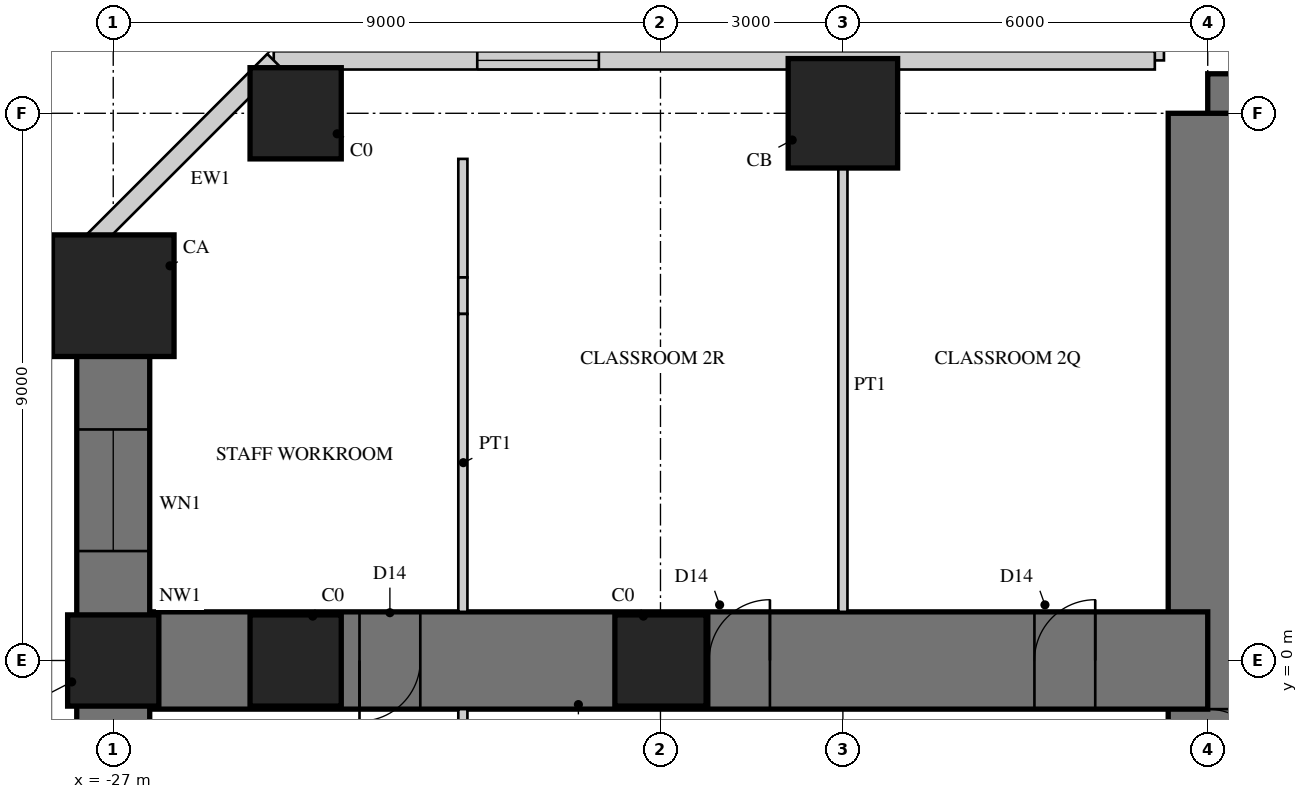
"""IFC4 building model, lengths in metres.
Left out: names, types, materials, properties, quantities, classifications, styles, units other than length and angle.
Written with IfcOpenShell. Run it as: python <this file> out.ifc"""

import sys

from ifc_helpers import new_model, si_unit, direction, frame, frame_2d, origin, origin_2d, place, context, subcontext, project, spatial, rectangle, hollow_rectangle, extrude, element, fill, save


model = new_model("IFC4")
c1 = context("Model", 3, precision=1e-05, world=origin(), true_north=direction((0.0, 1.0)))
c2 = subcontext(c1, "Body", "Model", "MODEL_VIEW")
j1 = project(units=[si_unit("LENGTHUNIT", "METRE"), si_unit("PLANEANGLEUNIT", "RADIAN")], contexts=[c1])
p1 = place(None, origin())
s1 = spatial("IfcSite", under=j1, at=p1, CompositionType="ELEMENT")
p2 = place(p1, origin())
s2 = spatial("IfcBuilding", under=s1, at=p2, CompositionType="ELEMENT")
p3 = place(p2, frame((0.0, 0.0, 9.5)))
s3 = spatial("IfcBuildingStorey", under=s2, at=p3, CompositionType="ELEMENT", Elevation=9.5)
p4 = place(p3, frame((9.0, 9.0, 0.0), z_axis=(0.0, 0.0, 1.0), x_axis=(-1.0, 0.0, 0.0)))
e1 = element("IfcWall", 1, at=p4, inside=s3, PredefinedType="SHEAR", context=c2, shape_type="SweptSolid", body=[
    extrude(rectangle(XDim=18.0, YDim=1.3, at=frame_2d((9.0, 0.0))), origin(), (0.0, 0.0, 1.0), 4.5),
])
p5 = place(p4, frame((9.8, 0.0, 0.0)))
e2 = element("IfcOpeningElement", 2, at=p5, cuts=e1, PredefinedType="OPENING", context=c2, shape_type="SweptSolid", body=[
    extrude(rectangle(XDim=1.0, YDim=2.4, at=frame_2d((0.5, 1.2))), frame((0.0, 0.66, 0.0), z_axis=(0.0, -1.0, 0.0), x_axis=(1.0, 0.0, 0.0)), (0.0, 0.0, 1.0), 1.32),
])
p6 = place(p3, frame((-9.0, 9.0, 0.0), z_axis=(0.0, 0.0, 1.0), x_axis=(0.0, -1.0, 0.0)))
e3 = element("IfcWall", 3, at=p6, inside=s3, PredefinedType="SHEAR", context=c2, shape_type="SweptSolid", body=[
    extrude(rectangle(XDim=18.0, YDim=1.3, at=frame_2d((9.0, 0.0))), origin(), (0.0, 0.0, 1.0), 4.5),
])
p7 = place(p6, frame((9.8, 0.0, 0.0)))
e4 = element("IfcOpeningElement", 4, at=p7, cuts=e3, PredefinedType="OPENING", context=c2, shape_type="SweptSolid", body=[
    extrude(rectangle(XDim=1.0, YDim=2.4, at=frame_2d((0.5, 1.2))), frame((0.0, 0.66, 0.0), z_axis=(0.0, -1.0, 0.0), x_axis=(1.0, 0.0, 0.0)), (0.0, 0.0, 1.0), 1.32),
])
p8 = place(p3, frame((-9.0, 0.0, 0.0), z_axis=(0.0, 0.0, 1.0), x_axis=(-1.0, 0.0, 0.0)))
e5 = element("IfcWall", 5, at=p8, inside=s3, PredefinedType="SHEAR", context=c2, shape_type="SweptSolid", body=[
    extrude(rectangle(XDim=18.0, YDim=1.6, at=frame_2d((9.0, 0.0))), origin(), (0.0, 0.0, 1.0), 4.5),
])
p9 = place(p8, frame((1.85, 0.0, 0.0)))
e6 = element("IfcOpeningElement", 6, at=p9, cuts=e5, PredefinedType="OPENING", context=c2, shape_type="SweptSolid", body=[
    extrude(rectangle(XDim=1.0, YDim=2.2, at=frame_2d((0.5, 1.1))), frame((0.0, 0.81, 0.0), z_axis=(0.0, -1.0, 0.0), x_axis=(1.0, 0.0, 0.0)), (0.0, 0.0, 1.0), 1.62),
])
p10 = place(p8, frame((7.2, 0.0, 0.0)))
e7 = element("IfcOpeningElement", 7, at=p10, cuts=e5, PredefinedType="OPENING", context=c2, shape_type="SweptSolid", body=[
    extrude(rectangle(XDim=1.0, YDim=2.2, at=frame_2d((0.5, 1.1))), frame((0.0, 0.81, 0.0), z_axis=(0.0, -1.0, 0.0), x_axis=(1.0, 0.0, 0.0)), (0.0, 0.0, 1.0), 1.62),
])
p11 = place(p8, frame((12.95, 0.0, 0.0)))
e8 = element("IfcOpeningElement", 8, at=p11, cuts=e5, PredefinedType="OPENING", context=c2, shape_type="SweptSolid", body=[
    extrude(rectangle(XDim=1.0, YDim=2.2, at=frame_2d((0.5, 1.1))), frame((0.0, 0.81, 0.0), z_axis=(0.0, -1.0, 0.0), x_axis=(1.0, 0.0, 0.0)), (0.0, 0.0, 1.0), 1.62),
])
p12 = place(p3, frame((-27.0, 6.0, 0.0), z_axis=(0.0, 0.0, 1.0), x_axis=(0.0, -1.0, 0.0)))
e9 = element("IfcWall", 9, at=p12, inside=s3, PredefinedType="SHEAR", context=c2, shape_type="SweptSolid", body=[
    extrude(rectangle(XDim=12.0, YDim=1.2, at=frame_2d((6.0, 0.0))), origin(), (0.0, 0.0, 1.0), 4.5),
])
p13 = place(p12, frame((2.2, 0.0, 0.9)))
e10 = element("IfcOpeningElement", 10, at=p13, cuts=e9, PredefinedType="OPENING", context=c2, shape_type="SweptSolid", body=[
    extrude(rectangle(XDim=2.0, YDim=1.8, at=frame_2d((1.0, 0.9))), frame((0.0, 0.61, 0.0), z_axis=(0.0, -1.0, 0.0), x_axis=(1.0, 0.0, 0.0)), (0.0, 0.0, 1.0), 1.22),
])
p14 = place(p12, frame((7.8, 0.0, 0.9)))
e11 = element("IfcOpeningElement", 11, at=p14, cuts=e9, PredefinedType="OPENING", context=c2, shape_type="SweptSolid", body=[
    extrude(rectangle(XDim=2.0, YDim=1.8, at=frame_2d((1.0, 0.9))), frame((0.0, 0.61, 0.0), z_axis=(0.0, -1.0, 0.0), x_axis=(1.0, 0.0, 0.0)), (0.0, 0.0, 1.0), 1.22),
])
p15 = place(p3, frame((-15.0, 9.0, 0.0), z_axis=(0.0, 0.0, 1.0), x_axis=(1.0, 0.0, 0.0)))
e12 = element("IfcColumn", 12, at=p15, inside=s3, PredefinedType="COLUMN", context=c2, shape_type="SweptSolid", body=[
    extrude(rectangle(XDim=1.8, YDim=1.8, at=origin_2d()), origin(), (0.0, 0.0, 1.0), 4.5),
])
p16 = place(p3, frame((-24.0, 9.0, 0.0), z_axis=(0.0, 0.0, 1.0), x_axis=(1.0, 0.0, 0.0)))
e13 = element("IfcColumn", 13, at=p16, inside=s3, PredefinedType="COLUMN", context=c2, shape_type="SweptSolid", body=[
    extrude(rectangle(XDim=1.5, YDim=1.5, at=origin_2d()), origin(), (0.0, 0.0, 1.0), 4.5),
])
p17 = place(p3, frame((-27.0, 6.0, 0.0), z_axis=(0.0, 0.0, 1.0), x_axis=(1.0, 0.0, 0.0)))
e14 = element("IfcColumn", 14, at=p17, inside=s3, PredefinedType="COLUMN", context=c2, shape_type="SweptSolid", body=[
    extrude(rectangle(XDim=2.0, YDim=2.0, at=origin_2d()), origin(), (0.0, 0.0, 1.0), 4.5),
])
for number, where, z_axis, x_axis in (
    (15, (-27.0, 0.0, 0.0), (0.0, 0.0, 1.0), (1.0, 0.0, 0.0)),
    (16, (-18.0, 0.0, 0.0), (0.0, 0.0, 1.0), (1.0, 0.0, 0.0)),
    (17, (-24.0, 0.0, 0.0), (0.0, 0.0, 1.0), (1.0, 0.0, 0.0)),
):
    element("IfcColumn", number, at=place(p3, frame(where, z_axis=z_axis, x_axis=x_axis)), inside=s3, PredefinedType="COLUMN", context=c2, shape_type="SweptSolid", body=[
        extrude(rectangle(XDim=1.5, YDim=1.5, at=origin_2d()), origin(), (0.0, 0.0, 1.0), 4.5),
    ])
p18 = place(p3, frame((-9.87, 24.36, 0.0), z_axis=(0.0, 0.0, 1.0), x_axis=(0.0, -1.0, 0.0)))
e18 = element("IfcWall", 18, at=p18, inside=s3, PredefinedType="SOLIDWALL", context=c2, shape_type="SweptSolid", body=[
    extrude(rectangle(XDim=14.49, YDim=0.3, at=frame_2d((7.245, 0.0))), origin(), (0.0, 0.0, 1.0), 4.3),
])
p19 = place(p18, frame((3.347, 0.0, 0.9)))
e19 = element("IfcOpeningElement", 19, at=p19, cuts=e18, PredefinedType="OPENING", context=c2, shape_type="SweptSolid", body=[
    extrude(rectangle(XDim=2.0, YDim=1.8, at=frame_2d((1.0, 0.9))), frame((0.0, 0.16, 0.0), z_axis=(0.0, -1.0, 0.0), x_axis=(1.0, 0.0, 0.0)), (0.0, 0.0, 1.0), 0.32),
])
p20 = place(p18, frame((6.245, 0.0, 0.9)))
e20 = element("IfcOpeningElement", 20, at=p20, cuts=e18, PredefinedType="OPENING", context=c2, shape_type="SweptSolid", body=[
    extrude(rectangle(XDim=2.0, YDim=1.8, at=frame_2d((1.0, 0.9))), frame((0.0, 0.16, 0.0), z_axis=(0.0, -1.0, 0.0), x_axis=(1.0, 0.0, 0.0)), (0.0, 0.0, 1.0), 0.32),
])
p21 = place(p3, frame((-9.87, 9.87, 0.0), z_axis=(0.0, 0.0, 1.0), x_axis=(-1.0, 0.0, 0.0)))
e21 = element("IfcWall", 21, at=p21, inside=s3, PredefinedType="SOLIDWALL", context=c2, shape_type="SweptSolid", body=[
    extrude(rectangle(XDim=14.49, YDim=0.3, at=frame_2d((7.245, 0.0))), origin(), (0.0, 0.0, 1.0), 4.3),
])
p22 = place(p21, frame((9.143, 0.0, 0.9)))
e22 = element("IfcOpeningElement", 22, at=p22, cuts=e21, PredefinedType="OPENING", context=c2, shape_type="SweptSolid", body=[
    extrude(rectangle(XDim=2.0, YDim=1.8, at=frame_2d((1.0, 0.9))), frame((0.0, 0.16, 0.0), z_axis=(0.0, -1.0, 0.0), x_axis=(1.0, 0.0, 0.0)), (0.0, 0.0, 1.0), 0.32),
])
p23 = place(p3, frame((-24.36, 9.87, 0.0), z_axis=(0.0, 0.0, 1.0), x_axis=(-0.707106781187, -0.707106781187, 0.0)))
e23 = element("IfcWall", 23, at=p23, inside=s3, PredefinedType="SOLIDWALL", context=c2, shape_type="SweptSolid", body=[
    extrude(rectangle(XDim=4.582, YDim=0.3, at=frame_2d((2.291, 0.0))), origin(), (0.0, 0.0, 1.0), 4.3),
])
p24 = place(p3, frame((-15.0, 8.25, 0.0), z_axis=(0.0, 0.0, 1.0), x_axis=(0.0, -1.0, 0.0)))
e24 = element("IfcWall", 24, at=p24, inside=s3, PredefinedType="PARTITIONING", context=c2, shape_type="SweptSolid", body=[
    extrude(rectangle(XDim=7.45, YDim=0.15, at=frame_2d((3.725, 0.0))), origin(), (0.0, 0.0, 1.0), 3.35),
])
p25 = place(p3, frame((-21.25, 8.25, 0.0), z_axis=(0.0, 0.0, 1.0), x_axis=(0.0, -1.0, 0.0)))
e25 = element("IfcWall", 25, at=p25, inside=s3, PredefinedType="PARTITIONING", context=c2, shape_type="SweptSolid", body=[
    extrude(rectangle(XDim=1.95, YDim=0.15, at=frame_2d((0.975, 0.0))), origin(), (0.0, 0.0, 1.0), 3.35),
])
p26 = place(p3, frame((-21.25, 6.3, 0.0), z_axis=(0.0, 0.0, 1.0), x_axis=(0.0, -1.0, 0.0)))
e26 = element("IfcWall", 26, at=p26, inside=s3, PredefinedType="PARTITIONING", context=c2, shape_type="SweptSolid", body=[
    extrude(rectangle(XDim=0.6, YDim=0.15, at=frame_2d((0.3, 0.0))), origin(), (0.0, 0.0, 1.0), 4.3),
])
p27 = place(p3, frame((-21.25, 5.7, 0.0), z_axis=(0.0, 0.0, 1.0), x_axis=(0.0, -1.0, 0.0)))
e27 = element("IfcWall", 27, at=p27, inside=s3, PredefinedType="PARTITIONING", context=c2, shape_type="SweptSolid", body=[
    extrude(rectangle(XDim=4.9, YDim=0.15, at=frame_2d((2.45, 0.0))), origin(), (0.0, 0.0, 1.0), 3.35),
])
p28 = place(p3, frame((-21.25, -0.8, 0.0), z_axis=(0.0, 0.0, 1.0), x_axis=(0.0, -1.0, 0.0)))
e28 = element("IfcWall", 28, at=p28, inside=s3, PredefinedType="PARTITIONING", context=c2, shape_type="SweptSolid", body=[
    extrude(rectangle(XDim=4.9, YDim=0.15, at=frame_2d((2.45, 0.0))), origin(), (0.0, 0.0, 1.0), 3.35),
])
p29 = place(p28, frame((0.35, 0.0, 0.0)))
e29 = element("IfcOpeningElement", 29, at=p29, cuts=e28, PredefinedType="OPENING", context=c2, shape_type="SweptSolid", body=[
    extrude(rectangle(XDim=1.0, YDim=2.2, at=frame_2d((0.5, 1.1))), frame((0.0, 0.085, 0.0), z_axis=(0.0, -1.0, 0.0), x_axis=(1.0, 0.0, 0.0)), (0.0, 0.0, 1.0), 0.17),
])
p30 = place(p22, origin())
e30 = element("IfcWindow", 30, at=p30, inside=s3, PartitioningType="SINGLE_PANEL", PredefinedType="WINDOW", context=c2, shape_type="SweptSolid", body=[
    extrude(hollow_rectangle(XDim=2.0, YDim=1.8, WallThickness=0.06, at=frame_2d((1.0, 0.9))), frame((0.0, 0.03, 0.0), z_axis=(0.0, -1.0, 0.0), x_axis=(1.0, 0.0, 0.0)), (0.0, 0.0, 1.0), 0.06),
    extrude(rectangle(XDim=1.879, YDim=1.679, at=frame_2d((1.0, 0.9))), frame((0.0, 0.03, 0.0), z_axis=(0.0, -1.0, 0.0), x_axis=(1.0, 0.0, 0.0)), (0.0, 0.0, 1.0), 0.06),
])
fill(e22, e30)
p31 = place(p13, origin())
e31 = element("IfcWindow", 31, at=p31, inside=s3, PartitioningType="SINGLE_PANEL", PredefinedType="WINDOW", context=c2, shape_type="SweptSolid", body=[
    extrude(hollow_rectangle(XDim=2.0, YDim=1.8, WallThickness=0.06, at=frame_2d((1.0, 0.9))), frame((0.0, 0.03, 0.0), z_axis=(0.0, -1.0, 0.0), x_axis=(1.0, 0.0, 0.0)), (0.0, 0.0, 1.0), 0.06),
    extrude(rectangle(XDim=1.879, YDim=1.679, at=frame_2d((1.0, 0.9))), frame((0.0, 0.03, 0.0), z_axis=(0.0, -1.0, 0.0), x_axis=(1.0, 0.0, 0.0)), (0.0, 0.0, 1.0), 0.06),
])
fill(e10, e31)
p32 = place(p9, frame((1.0, 0.0, 0.0), z_axis=(0.0, 0.0, 1.0), x_axis=(-1.0, 0.0, 0.0)))
e32 = element("IfcDoor", 32, at=p32, inside=s3, OperationType="SINGLE_SWING_RIGHT", PredefinedType="DOOR", context=c2, shape_type="SweptSolid", body=[
    extrude(rectangle(XDim=1.0, YDim=2.2, at=frame_2d((0.5, 1.1))), frame((0.0, 0.025, 0.0), z_axis=(0.0, -1.0, 0.0), x_axis=(1.0, 0.0, 0.0)), (0.0, 0.0, 1.0), 0.05),
])
fill(e6, e32)
p33 = place(p10, frame((1.0, 0.0, 0.0), z_axis=(0.0, 0.0, 1.0), x_axis=(-1.0, 0.0, 0.0)))
e33 = element("IfcDoor", 33, at=p33, inside=s3, OperationType="SINGLE_SWING_RIGHT", PredefinedType="DOOR", context=c2, shape_type="SweptSolid", body=[
    extrude(rectangle(XDim=1.0, YDim=2.2, at=frame_2d((0.5, 1.1))), frame((0.0, 0.025, 0.0), z_axis=(0.0, -1.0, 0.0), x_axis=(1.0, 0.0, 0.0)), (0.0, 0.0, 1.0), 0.05),
])
fill(e7, e33)
p34 = place(p11, origin())
e34 = element("IfcDoor", 34, at=p34, inside=s3, OperationType="SINGLE_SWING_RIGHT", PredefinedType="DOOR", context=c2, shape_type="SweptSolid", body=[
    extrude(rectangle(XDim=1.0, YDim=2.2, at=frame_2d((0.5, 1.1))), frame((0.0, 0.025, 0.0), z_axis=(0.0, -1.0, 0.0), x_axis=(1.0, 0.0, 0.0)), (0.0, 0.0, 1.0), 0.05),
])
fill(e8, e34)
p35 = place(p7, origin())
e35 = element("IfcDoor", 35, at=p35, inside=s3, OperationType="SINGLE_SWING_RIGHT", PredefinedType="DOOR", context=c2, shape_type="SweptSolid", body=[
    extrude(rectangle(XDim=1.0, YDim=2.4, at=frame_2d((0.5, 1.2))), frame((0.0, 0.055, 0.0), z_axis=(0.0, -1.0, 0.0), x_axis=(1.0, 0.0, 0.0)), (0.0, 0.0, 1.0), 0.05),
])
fill(e4, e35)
save(model, sys.argv[1])
